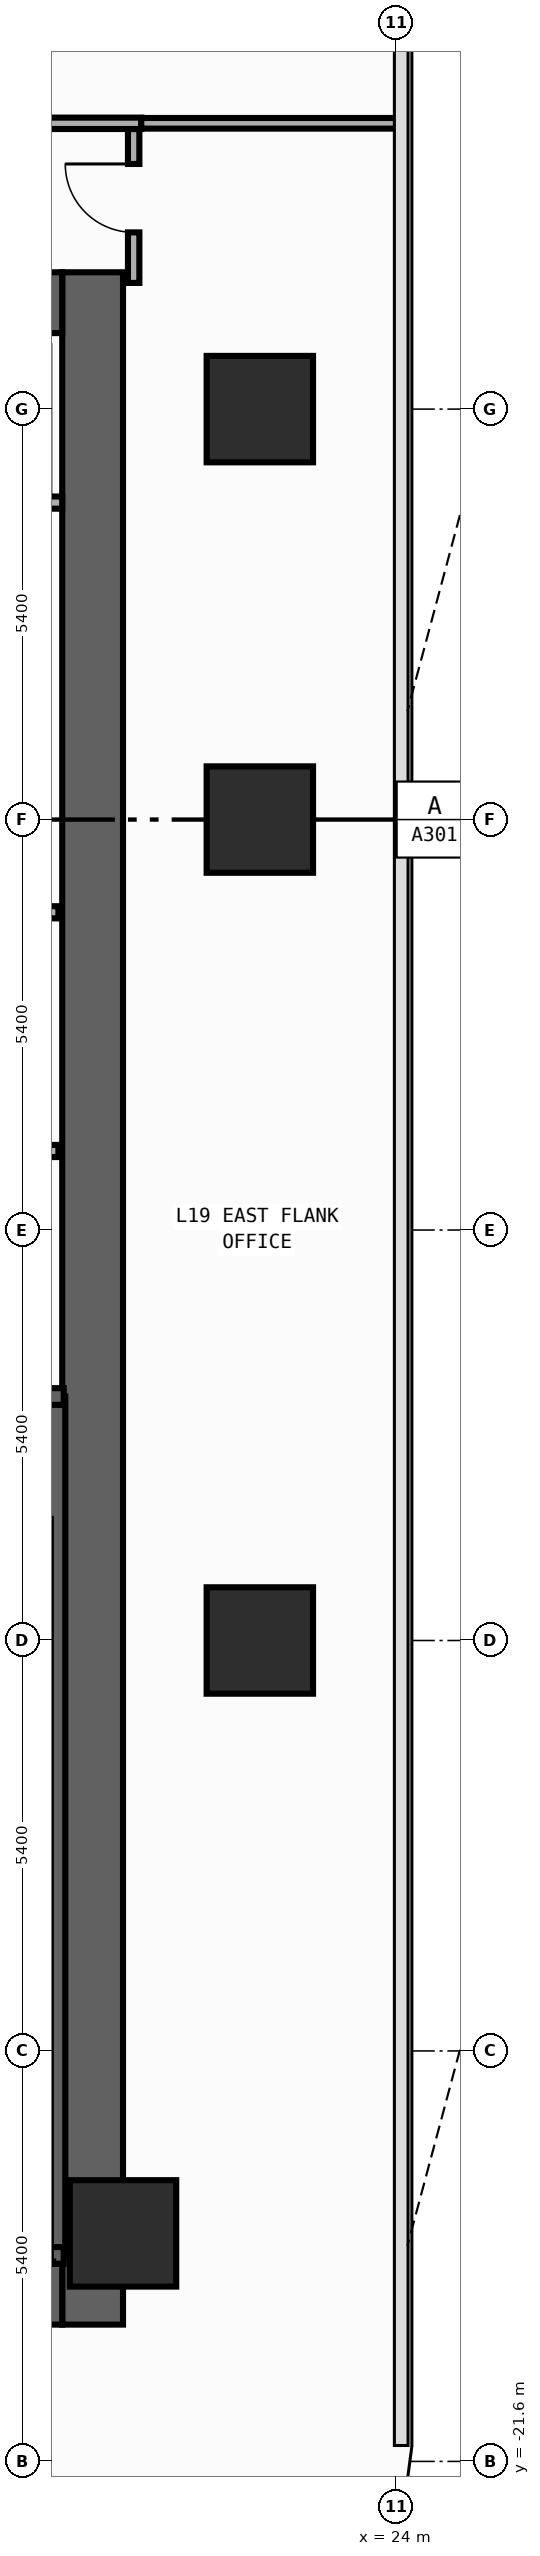
"""IFC4 building model, lengths in metres.
Left out: names, types, materials, properties, quantities, classifications, styles, units other than length and angle.
Written with IfcOpenShell. Run it as: python <this file> out.ifc"""

import sys

from ifc_helpers import new_model, si_unit, direction, frame, frame_2d, origin, origin_2d, place, context, subcontext, project, spatial, rectangle, extrude, element, fill, save


model = new_model("IFC4")
c1 = context("Model", 3, precision=1e-05, world=origin(), true_north=direction((0.0, 1.0)))
c2 = subcontext(c1, "Body", "Model", "MODEL_VIEW")
j1 = project(units=[si_unit("LENGTHUNIT", "METRE"), si_unit("PLANEANGLEUNIT", "RADIAN")], contexts=[c1])
p1 = place(None, origin())
s1 = spatial("IfcSite", under=j1, at=p1, CompositionType="ELEMENT")
p2 = place(p1, origin())
s2 = spatial("IfcBuilding", under=s1, at=p2, CompositionType="ELEMENT")
p3 = place(p2, frame((0.0, 0.0, 80.6)))
s3 = spatial("IfcBuildingStorey", under=s2, at=p3, CompositionType="ELEMENT", Elevation=80.6)
p4 = place(p3, frame((20.0, -19.8, 0.0), z_axis=(0.0, 0.0, 1.0), x_axis=(0.0, 1.0, 0.0)))
e1 = element("IfcWall", 1, at=p4, inside=s3, PredefinedType="SHEAR", context=c2, shape_type="SweptSolid", body=[
    extrude(rectangle(XDim=27.0, YDim=0.8, at=frame_2d((13.5, 0.0))), origin(), (0.0, 0.0, 1.0), 3.85),
])
for number, where, z_axis, x_axis in (
    (2, (12.8, -19.4, 0.0), (0.0, 0.0, 1.0), (1.0, 0.0, 0.0)),
    (3, (12.8, 6.8, 0.0), (0.0, 0.0, 1.0), (1.0, 0.0, 0.0)),
):
    element("IfcWall", number, at=place(p3, frame(where, z_axis=z_axis, x_axis=x_axis)), inside=s3, PredefinedType="SHEAR", context=c2, shape_type="SweptSolid", body=[
        extrude(rectangle(XDim=6.8, YDim=0.8, at=frame_2d((3.4, 0.0))), origin(), (0.0, 0.0, 1.0), 3.85),
    ])
p5 = place(p3, frame((19.53, -18.89, 0.0), z_axis=(0.0, 0.0, 1.0), x_axis=(0.0, 1.0, 0.0)))
e4 = element("IfcWall", 4, at=p5, inside=s3, PredefinedType="SHEAR", context=c2, shape_type="SweptSolid", body=[
    extrude(rectangle(XDim=11.3, YDim=0.22, at=frame_2d((5.65, 0.0))), origin(), (0.0, 0.0, 1.0), 3.85),
])
p6 = place(p3, frame((15.705, -18.89, 0.0), z_axis=(0.0, 0.0, 1.0), x_axis=(1.0, 0.0, 0.0)))
e5 = element("IfcWall", 5, at=p6, inside=s3, PredefinedType="SHEAR", context=c2, shape_type="SweptSolid", body=[
    extrude(rectangle(XDim=3.915, YDim=0.22, at=frame_2d((1.958, 0.0))), origin(), (0.0, 0.0, 1.0), 3.85),
])
p7 = place(p3, frame((19.62, -7.59, 0.0), z_axis=(0.0, 0.0, 1.0), x_axis=(-1.0, 0.0, 0.0)))
e6 = element("IfcWall", 6, at=p7, inside=s3, PredefinedType="SHEAR", context=c2, shape_type="SweptSolid", body=[
    extrude(rectangle(XDim=3.915, YDim=0.22, at=frame_2d((1.958, 0.0))), origin(), (0.0, 0.0, 1.0), 3.85),
])
p8 = place(p7, frame((1.08, 0.0, 0.0)))
e7 = element("IfcOpeningElement", 7, at=p8, cuts=e6, PredefinedType="OPENING", context=c2, shape_type="SweptSolid", body=[
    extrude(rectangle(XDim=1.1, YDim=2.2, at=frame_2d((0.55, 1.1))), frame((0.0, 0.12, 0.0), z_axis=(0.0, -1.0, 0.0), x_axis=(1.0, 0.0, 0.0)), (0.0, 0.0, 1.0), 0.24),
])
for number, where, z_axis, x_axis in (
    (8, (20.4, -18.6, 0.0), (0.0, 0.0, 1.0), (1.0, 0.0, 0.0)),
    (9, (22.2, -10.8, 0.0), (0.0, 0.0, 1.0), (1.0, 0.0, 0.0)),
    (10, (22.2, 0.0, 0.0), (0.0, 0.0, 1.0), (1.0, 0.0, 0.0)),
    (11, (22.2, 5.4, 0.0), (0.0, 0.0, 1.0), (1.0, 0.0, 0.0)),
):
    element("IfcColumn", number, at=place(p3, frame(where, z_axis=z_axis, x_axis=x_axis)), inside=s3, PredefinedType="COLUMN", context=c2, shape_type="SweptSolid", body=[
        extrude(rectangle(XDim=1.4, YDim=1.4, at=origin_2d()), origin(), (0.0, 0.0, 1.0), 4.2),
    ])
p9 = place(p3, frame((15.75, -4.36, 0.0), z_axis=(0.0, 0.0, 1.0), x_axis=(1.0, 0.0, 0.0)))
e12 = element("IfcWall", 12, at=p9, inside=s3, PredefinedType="STANDARD", context=c2, shape_type="SweptSolid", body=[
    extrude(rectangle(XDim=3.8, YDim=0.16, at=frame_2d((1.9, 0.0))), origin(), (0.0, 0.0, 1.0), 3.85),
])
p10 = place(p9, frame((1.47, 0.0, 0.0)))
e13 = element("IfcOpeningElement", 13, at=p10, cuts=e12, PredefinedType="OPENING", context=c2, shape_type="SweptSolid", body=[
    extrude(rectangle(XDim=1.15, YDim=2.2, at=frame_2d((0.575, 1.1))), frame((0.0, 0.09, 0.0), z_axis=(0.0, -1.0, 0.0), x_axis=(1.0, 0.0, 0.0)), (0.0, 0.0, 1.0), 0.18),
])
p11 = place(p3, frame((15.75, -1.22, 0.0), z_axis=(0.0, 0.0, 1.0), x_axis=(1.0, 0.0, 0.0)))
e14 = element("IfcWall", 14, at=p11, inside=s3, PredefinedType="STANDARD", context=c2, shape_type="SweptSolid", body=[
    extrude(rectangle(XDim=3.8, YDim=0.16, at=frame_2d((1.9, 0.0))), origin(), (0.0, 0.0, 1.0), 3.85),
])
p12 = place(p3, frame((17.31, 4.17, 0.0), z_axis=(0.0, 0.0, 1.0), x_axis=(1.0, 0.0, 0.0)))
e15 = element("IfcWall", 15, at=p12, inside=s3, PredefinedType="PARTITIONING", context=c2, shape_type="SweptSolid", body=[
    extrude(rectangle(XDim=2.29, YDim=0.16, at=frame_2d((1.145, 0.0))), origin(), (0.0, 0.0, 1.0), 3.85),
])
p13 = place(p3, frame((20.54, 7.06, 0.0), z_axis=(0.0, 0.0, 1.0), x_axis=(0.0, 1.0, 0.0)))
e16 = element("IfcWall", 16, at=p13, inside=s3, PredefinedType="PARTITIONING", context=c2, shape_type="SweptSolid", body=[
    extrude(rectangle(XDim=2.025, YDim=0.15, at=frame_2d((1.012, 0.0))), origin(), (0.0, 0.0, 1.0), 3.85),
])
p14 = place(p13, frame((0.665, 0.0, 0.0)))
e17 = element("IfcOpeningElement", 17, at=p14, cuts=e16, PredefinedType="OPENING", context=c2, shape_type="SweptSolid", body=[
    extrude(rectangle(XDim=0.9, YDim=2.15, at=frame_2d((0.45, 1.075))), frame((0.0, 0.085, 0.0), z_axis=(0.0, -1.0, 0.0), x_axis=(1.0, 0.0, 0.0)), (0.0, 0.0, 1.0), 0.17),
])
p15 = place(p3, frame((11.81, 9.16, 0.0), z_axis=(0.0, 0.0, 1.0), x_axis=(1.0, 0.0, 0.0)))
e18 = element("IfcWall", 18, at=p15, inside=s3, PredefinedType="PARTITIONING", context=c2, shape_type="SweptSolid", body=[
    extrude(rectangle(XDim=8.83, YDim=0.15, at=frame_2d((4.415, 0.0))), origin(), (0.0, 0.0, 1.0), 3.85),
])
p16 = place(p15, frame((5.067, 0.0, 0.0)))
e19 = element("IfcOpeningElement", 19, at=p16, cuts=e18, PredefinedType="OPENING", context=c2, shape_type="SweptSolid", body=[
    extrude(rectangle(XDim=0.9, YDim=2.15, at=frame_2d((0.45, 1.075))), frame((0.0, 0.085, 0.0), z_axis=(0.0, -1.0, 0.0), x_axis=(1.0, 0.0, 0.0)), (0.0, 0.0, 1.0), 0.17),
])
p17 = place(p3, frame((20.64, 9.16, 0.0), z_axis=(0.0, 0.0, 1.0), x_axis=(1.0, 0.0, 0.0)))
e20 = element("IfcWall", 20, at=p17, inside=s3, PredefinedType="PARTITIONING", context=c2, shape_type="SweptSolid", body=[
    extrude(rectangle(XDim=3.415, YDim=0.14, at=frame_2d((1.708, 0.0))), origin(), (0.0, 0.0, 1.0), 3.85),
])
p18 = place(p14, origin())
e21 = element("IfcDoor", 21, at=p18, inside=s3, OperationType="SINGLE_SWING_RIGHT", PredefinedType="DOOR", context=c2, shape_type="SweptSolid", body=[
    extrude(rectangle(XDim=0.9, YDim=2.15, at=frame_2d((0.45, 1.075))), frame((0.0, 0.025, 0.0), z_axis=(0.0, -1.0, 0.0), x_axis=(1.0, 0.0, 0.0)), (0.0, 0.0, 1.0), 0.05),
])
fill(e17, e21)
save(model, sys.argv[1])
